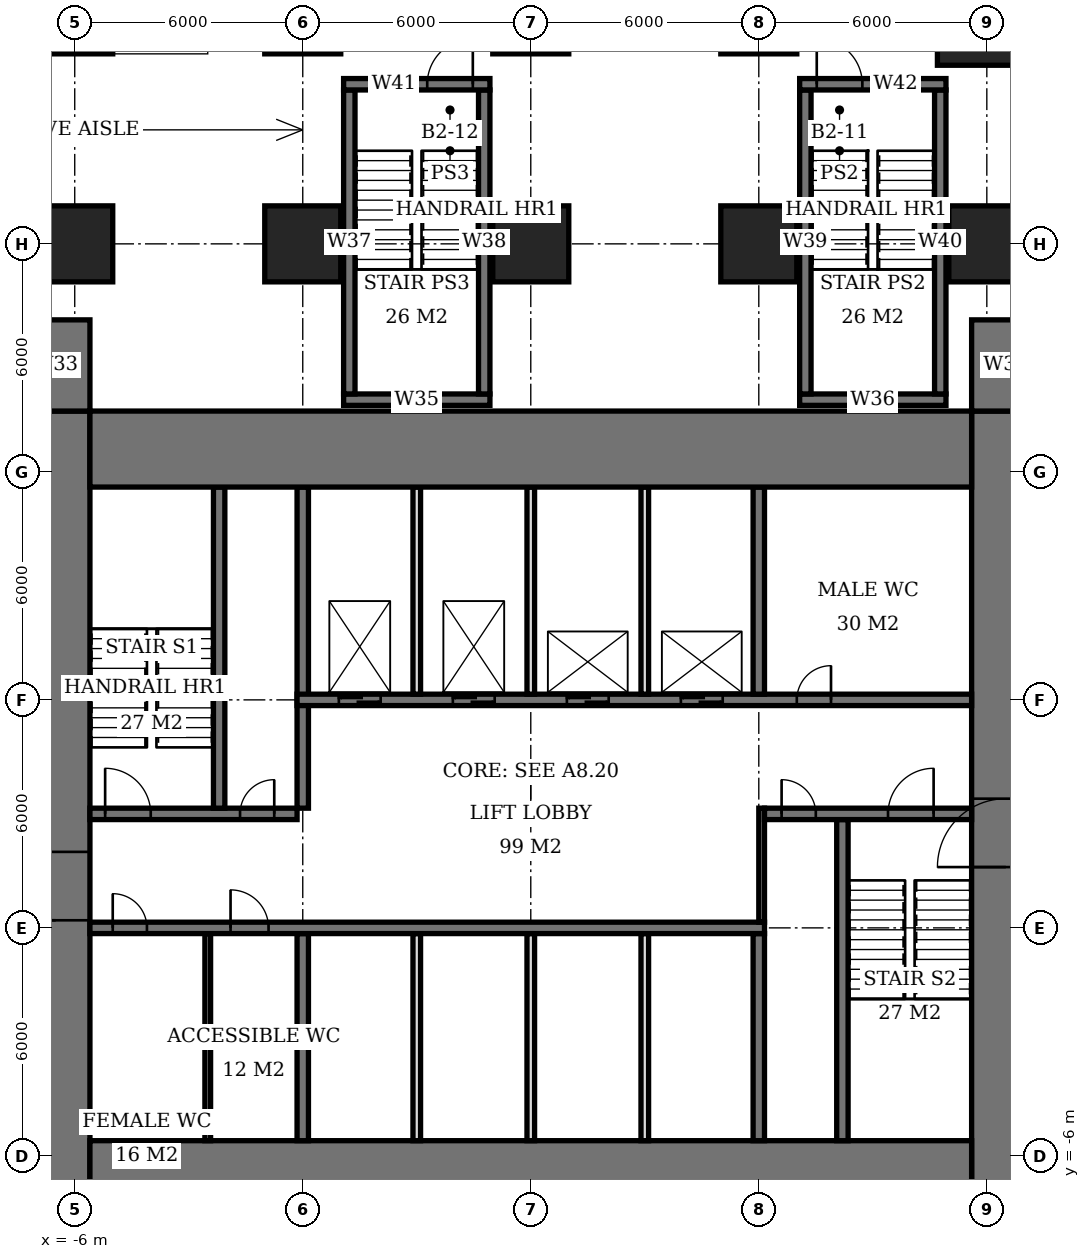
"""IFC4 building model, lengths in metres.
Left out: names, types, materials, properties, quantities, classifications, styles, units other than length and angle.
Written with IfcOpenShell. Run it as: python <this file> out.ifc"""

import sys

from ifc_helpers import new_model, si_unit, direction, frame, frame_2d, origin, origin_2d, place, context, subcontext, project, spatial, rectangle, extrude, element, fill, save


model = new_model("IFC4")
c1 = context("Model", 3, precision=1e-05, world=origin(), true_north=direction((0.0, 1.0)))
c2 = subcontext(c1, "Body", "Model", "MODEL_VIEW")
j1 = project(units=[si_unit("LENGTHUNIT", "METRE"), si_unit("PLANEANGLEUNIT", "RADIAN")], contexts=[c1])
p1 = place(None, origin())
s1 = spatial("IfcSite", under=j1, at=p1, CompositionType="ELEMENT")
p2 = place(p1, origin())
s2 = spatial("IfcBuilding", under=s1, at=p2, CompositionType="ELEMENT")
p3 = place(p2, frame((0.0, 0.0, -9.0)))
s3 = spatial("IfcBuildingStorey", under=s2, at=p3, CompositionType="ELEMENT", Elevation=-9.0)
for number, where, z_axis, x_axis in (
    (1, (-6.0, 18.0, 0.0), (0.0, 0.0, 1.0), (1.0, 0.0, 0.0)),
    (2, (-6.0, 24.0, 0.0), (0.0, 0.0, 1.0), (1.0, 0.0, 0.0)),
    (3, (0.0, 18.0, 0.0), (0.0, 0.0, 1.0), (1.0, 0.0, 0.0)),
    (4, (0.0, 24.0, 0.0), (0.0, 0.0, 1.0), (1.0, 0.0, 0.0)),
    (5, (6.0, 18.0, 0.0), (0.0, 0.0, 1.0), (1.0, 0.0, 0.0)),
    (6, (6.0, 24.0, 0.0), (0.0, 0.0, 1.0), (1.0, 0.0, 0.0)),
    (7, (12.0, 18.0, 0.0), (0.0, 0.0, 1.0), (1.0, 0.0, 0.0)),
    (8, (12.0, 24.0, 0.0), (0.0, 0.0, 1.0), (1.0, 0.0, 0.0)),
    (9, (18.0, 18.0, 0.0), (0.0, 0.0, 1.0), (1.0, 0.0, 0.0)),
):
    element("IfcColumn", number, at=place(p3, frame(where, z_axis=z_axis, x_axis=x_axis)), inside=s3, PredefinedType="COLUMN", context=c2, shape_type="SweptSolid", body=[
        extrude(rectangle(XDim=2.0, YDim=2.0, at=origin_2d()), origin(), (0.0, 0.0, 1.0), 4.5),
    ])
p4 = place(p3, frame((18.0, 24.0, 0.0), z_axis=(0.0, 0.0, 1.0), x_axis=(1.0, 0.0, 0.0)))
e10 = element("IfcColumn", 10, at=p4, inside=s3, PredefinedType="COLUMN", context=c2, shape_type="SweptSolid", body=[
    extrude(rectangle(XDim=2.6, YDim=2.6, at=origin_2d()), origin(), (0.0, 0.0, 1.0), 4.5),
])
for number, where, z_axis, x_axis in (
    (11, (-5.6, -6.6, 0.0), (0.0, 0.0, 1.0), (1.0, 0.0, 0.0)),
    (12, (-5.6, 12.6, 0.0), (0.0, 0.0, 1.0), (1.0, 0.0, 0.0)),
):
    element("IfcWall", number, at=place(p3, frame(where, z_axis=z_axis, x_axis=x_axis)), inside=s3, PredefinedType="SHEAR", context=c2, shape_type="SweptSolid", body=[
        extrude(rectangle(XDim=23.2, YDim=2.0, at=frame_2d((11.6, 0.0))), origin(), (0.0, 0.0, 1.0), 4.5),
    ])
p5 = place(p3, frame((-6.5, -7.6, 0.0), z_axis=(0.0, 0.0, 1.0), x_axis=(0.0, 1.0, 0.0)))
e13 = element("IfcWall", 13, at=p5, inside=s3, PredefinedType="SHEAR", context=c2, shape_type="SweptSolid", body=[
    extrude(rectangle(XDim=21.2, YDim=1.8, at=frame_2d((10.6, 0.0))), origin(), (0.0, 0.0, 1.0), 4.5),
])
p6 = place(p5, frame((7.8, 0.0, 0.0)))
e14 = element("IfcOpeningElement", 14, at=p6, cuts=e13, PredefinedType="OPENING", context=c2, shape_type="SweptSolid", body=[
    extrude(rectangle(XDim=1.8, YDim=2.4, at=frame_2d((0.9, 1.2))), frame((0.0, 0.91, 0.0), z_axis=(0.0, -1.0, 0.0), x_axis=(1.0, 0.0, 0.0)), (0.0, 0.0, 1.0), 1.82),
])
p7 = place(p3, frame((18.5, -7.6, 0.0), z_axis=(0.0, 0.0, 1.0), x_axis=(0.0, 1.0, 0.0)))
e15 = element("IfcWall", 15, at=p7, inside=s3, PredefinedType="SHEAR", context=c2, shape_type="SweptSolid", body=[
    extrude(rectangle(XDim=21.2, YDim=1.8, at=frame_2d((10.6, 0.0))), origin(), (0.0, 0.0, 1.0), 4.5),
])
p8 = place(p7, frame((9.2, 0.0, 0.0)))
e16 = element("IfcOpeningElement", 16, at=p8, cuts=e15, PredefinedType="OPENING", context=c2, shape_type="SweptSolid", body=[
    extrude(rectangle(XDim=1.8, YDim=2.4, at=frame_2d((0.9, 1.2))), frame((0.0, 0.91, 0.0), z_axis=(0.0, -1.0, 0.0), x_axis=(1.0, 0.0, 0.0)), (0.0, 0.0, 1.0), 1.82),
])
for number, where, z_axis, x_axis in (
    (17, (-6.5, 13.6, 0.0), (0.0, 0.0, 1.0), (0.0, 1.0, 0.0)),
    (18, (18.5, 13.6, 0.0), (0.0, 0.0, 1.0), (0.0, 1.0, 0.0)),
):
    element("IfcWall", number, at=place(p3, frame(where, z_axis=z_axis, x_axis=x_axis)), inside=s3, PredefinedType="SHEAR", context=c2, shape_type="SweptSolid", body=[
        extrude(rectangle(XDim=2.4, YDim=1.8, at=frame_2d((1.2, 0.0))), origin(), (0.0, 0.0, 1.0), 4.5),
    ])
p9 = place(p3, frame((-5.6, 0.0, 0.0), z_axis=(0.0, 0.0, 1.0), x_axis=(1.0, 0.0, 0.0)))
e19 = element("IfcWall", 19, at=p9, inside=s3, PredefinedType="SHEAR", context=c2, shape_type="SweptSolid", body=[
    extrude(rectangle(XDim=17.75, YDim=0.3, at=frame_2d((8.875, 0.0))), origin(), (0.0, 0.0, 1.0), 4.5),
])
p10 = place(p9, frame((0.6, 0.0, 0.0)))
e20 = element("IfcOpeningElement", 20, at=p10, cuts=e19, PredefinedType="OPENING", context=c2, shape_type="SweptSolid", body=[
    extrude(rectangle(XDim=0.9, YDim=2.1, at=frame_2d((0.45, 1.05))), frame((0.0, 0.16, 0.0), z_axis=(0.0, -1.0, 0.0), x_axis=(1.0, 0.0, 0.0)), (0.0, 0.0, 1.0), 0.32),
])
p11 = place(p9, frame((3.7, 0.0, 0.0)))
e21 = element("IfcOpeningElement", 21, at=p11, cuts=e19, PredefinedType="OPENING", context=c2, shape_type="SweptSolid", body=[
    extrude(rectangle(XDim=1.0, YDim=2.1, at=frame_2d((0.5, 1.05))), frame((0.0, 0.16, 0.0), z_axis=(0.0, -1.0, 0.0), x_axis=(1.0, 0.0, 0.0)), (0.0, 0.0, 1.0), 0.32),
])
p12 = place(p3, frame((-5.6, 3.0, 0.0), z_axis=(0.0, 0.0, 1.0), x_axis=(1.0, 0.0, 0.0)))
e22 = element("IfcWall", 22, at=p12, inside=s3, PredefinedType="SHEAR", context=c2, shape_type="SweptSolid", body=[
    extrude(rectangle(XDim=5.45, YDim=0.3, at=frame_2d((2.725, 0.0))), origin(), (0.0, 0.0, 1.0), 4.5),
])
p13 = place(p12, frame((0.4, 0.0, 0.0)))
e23 = element("IfcOpeningElement", 23, at=p13, cuts=e22, PredefinedType="OPENING", context=c2, shape_type="SweptSolid", body=[
    extrude(rectangle(XDim=1.2, YDim=2.1, at=frame_2d((0.6, 1.05))), frame((0.0, 0.16, 0.0), z_axis=(0.0, -1.0, 0.0), x_axis=(1.0, 0.0, 0.0)), (0.0, 0.0, 1.0), 0.32),
])
p14 = place(p12, frame((3.95, 0.0, 0.0)))
e24 = element("IfcOpeningElement", 24, at=p14, cuts=e22, PredefinedType="OPENING", context=c2, shape_type="SweptSolid", body=[
    extrude(rectangle(XDim=0.9, YDim=2.1, at=frame_2d((0.45, 1.05))), frame((0.0, 0.16, 0.0), z_axis=(0.0, -1.0, 0.0), x_axis=(1.0, 0.0, 0.0)), (0.0, 0.0, 1.0), 0.32),
])
p15 = place(p3, frame((12.15, 3.0, 0.0), z_axis=(0.0, 0.0, 1.0), x_axis=(1.0, 0.0, 0.0)))
e25 = element("IfcWall", 25, at=p15, inside=s3, PredefinedType="SHEAR", context=c2, shape_type="SweptSolid", body=[
    extrude(rectangle(XDim=5.45, YDim=0.3, at=frame_2d((2.725, 0.0))), origin(), (0.0, 0.0, 1.0), 4.5),
])
p16 = place(p15, frame((3.25, 0.0, 0.0)))
e26 = element("IfcOpeningElement", 26, at=p16, cuts=e25, PredefinedType="OPENING", context=c2, shape_type="SweptSolid", body=[
    extrude(rectangle(XDim=1.2, YDim=2.1, at=frame_2d((0.6, 1.05))), frame((0.0, 0.16, 0.0), z_axis=(0.0, -1.0, 0.0), x_axis=(1.0, 0.0, 0.0)), (0.0, 0.0, 1.0), 0.32),
])
p17 = place(p15, frame((0.45, 0.0, 0.0)))
e27 = element("IfcOpeningElement", 27, at=p17, cuts=e25, PredefinedType="OPENING", context=c2, shape_type="SweptSolid", body=[
    extrude(rectangle(XDim=0.9, YDim=2.1, at=frame_2d((0.45, 1.05))), frame((0.0, 0.16, 0.0), z_axis=(0.0, -1.0, 0.0), x_axis=(1.0, 0.0, 0.0)), (0.0, 0.0, 1.0), 0.32),
])
p18 = place(p3, frame((-0.15, 6.0, 0.0), z_axis=(0.0, 0.0, 1.0), x_axis=(1.0, 0.0, 0.0)))
e28 = element("IfcWall", 28, at=p18, inside=s3, PredefinedType="SHEAR", context=c2, shape_type="SweptSolid", body=[
    extrude(rectangle(XDim=17.75, YDim=0.3, at=frame_2d((8.875, 0.0))), origin(), (0.0, 0.0, 1.0), 4.5),
])
p19 = place(p18, frame((13.15, 0.0, 0.0)))
e29 = element("IfcOpeningElement", 29, at=p19, cuts=e28, PredefinedType="OPENING", context=c2, shape_type="SweptSolid", body=[
    extrude(rectangle(XDim=0.9, YDim=2.1, at=frame_2d((0.45, 1.05))), frame((0.0, 0.16, 0.0), z_axis=(0.0, -1.0, 0.0), x_axis=(1.0, 0.0, 0.0)), (0.0, 0.0, 1.0), 0.32),
])
p20 = place(p18, frame((1.1, 0.0, 0.0)))
e30 = element("IfcOpeningElement", 30, at=p20, cuts=e28, PredefinedType="OPENING", context=c2, shape_type="SweptSolid", body=[
    extrude(rectangle(XDim=1.1, YDim=2.1, at=frame_2d((0.55, 1.05))), frame((0.0, 0.16, 0.0), z_axis=(0.0, -1.0, 0.0), x_axis=(1.0, 0.0, 0.0)), (0.0, 0.0, 1.0), 0.32),
])
p21 = place(p18, frame((4.1, 0.0, 0.0)))
e31 = element("IfcOpeningElement", 31, at=p21, cuts=e28, PredefinedType="OPENING", context=c2, shape_type="SweptSolid", body=[
    extrude(rectangle(XDim=1.1, YDim=2.1, at=frame_2d((0.55, 1.05))), frame((0.0, 0.16, 0.0), z_axis=(0.0, -1.0, 0.0), x_axis=(1.0, 0.0, 0.0)), (0.0, 0.0, 1.0), 0.32),
])
p22 = place(p18, frame((7.1, 0.0, 0.0)))
e32 = element("IfcOpeningElement", 32, at=p22, cuts=e28, PredefinedType="OPENING", context=c2, shape_type="SweptSolid", body=[
    extrude(rectangle(XDim=1.1, YDim=2.1, at=frame_2d((0.55, 1.05))), frame((0.0, 0.16, 0.0), z_axis=(0.0, -1.0, 0.0), x_axis=(1.0, 0.0, 0.0)), (0.0, 0.0, 1.0), 0.32),
])
p23 = place(p18, frame((10.1, 0.0, 0.0)))
e33 = element("IfcOpeningElement", 33, at=p23, cuts=e28, PredefinedType="OPENING", context=c2, shape_type="SweptSolid", body=[
    extrude(rectangle(XDim=1.1, YDim=2.1, at=frame_2d((0.55, 1.05))), frame((0.0, 0.16, 0.0), z_axis=(0.0, -1.0, 0.0), x_axis=(1.0, 0.0, 0.0)), (0.0, 0.0, 1.0), 0.32),
])
p24 = place(p3, frame((0.0, -5.6, 0.0), z_axis=(0.0, 0.0, 1.0), x_axis=(0.0, 1.0, 0.0)))
e34 = element("IfcWall", 34, at=p24, inside=s3, PredefinedType="SHEAR", context=c2, shape_type="SweptSolid", body=[
    extrude(rectangle(XDim=5.45, YDim=0.3, at=frame_2d((2.725, 0.0))), origin(), (0.0, 0.0, 1.0), 4.5),
])
p25 = place(p3, frame((0.0, 3.15, 0.0), z_axis=(0.0, 0.0, 1.0), x_axis=(0.0, 1.0, 0.0)))
e35 = element("IfcWall", 35, at=p25, inside=s3, PredefinedType="SHEAR", context=c2, shape_type="SweptSolid", body=[
    extrude(rectangle(XDim=8.45, YDim=0.3, at=frame_2d((4.225, 0.0))), origin(), (0.0, 0.0, 1.0), 4.5),
])
for number, where, z_axis, x_axis in (
    (36, (12.0, -5.6, 0.0), (0.0, 0.0, 1.0), (0.0, 1.0, 0.0)),
    (37, (12.0, 6.15, 0.0), (0.0, 0.0, 1.0), (0.0, 1.0, 0.0)),
):
    element("IfcWall", number, at=place(p3, frame(where, z_axis=z_axis, x_axis=x_axis)), inside=s3, PredefinedType="SHEAR", context=c2, shape_type="SweptSolid", body=[
        extrude(rectangle(XDim=5.45, YDim=0.3, at=frame_2d((2.725, 0.0))), origin(), (0.0, 0.0, 1.0), 4.5),
    ])
for number, where, z_axis, x_axis in (
    (38, (-2.2, 3.15, 0.0), (0.0, 0.0, 1.0), (0.0, 1.0, 0.0)),
    (39, (14.2, -5.6, 0.0), (0.0, 0.0, 1.0), (0.0, 1.0, 0.0)),
):
    element("IfcWall", number, at=place(p3, frame(where, z_axis=z_axis, x_axis=x_axis)), inside=s3, PredefinedType="SHEAR", context=c2, shape_type="SweptSolid", body=[
        extrude(rectangle(XDim=8.45, YDim=0.3, at=frame_2d((4.225, 0.0))), origin(), (0.0, 0.0, 1.0), 4.5),
    ])
for number, where, z_axis, x_axis in (
    (40, (3.0, 6.15, -1.2), (0.0, 0.0, 1.0), (0.0, 1.0, 0.0)),
    (41, (6.0, 6.15, -1.2), (0.0, 0.0, 1.0), (0.0, 1.0, 0.0)),
    (42, (9.0, 6.15, -1.2), (0.0, 0.0, 1.0), (0.0, 1.0, 0.0)),
):
    element("IfcWall", number, at=place(p3, frame(where, z_axis=z_axis, x_axis=x_axis)), inside=s3, PredefinedType="SOLIDWALL", context=c2, shape_type="SweptSolid", body=[
        extrude(rectangle(XDim=5.45, YDim=0.2, at=frame_2d((2.725, 0.0))), origin(), (0.0, 0.0, 1.0), 5.7),
    ])
for number, where, z_axis, x_axis in (
    (43, (3.0, -5.6, 0.0), (0.0, 0.0, 1.0), (0.0, 1.0, 0.0)),
    (44, (6.0, -5.6, 0.0), (0.0, 0.0, 1.0), (0.0, 1.0, 0.0)),
    (45, (9.0, -5.6, 0.0), (0.0, 0.0, 1.0), (0.0, 1.0, 0.0)),
):
    element("IfcWall", number, at=place(p3, frame(where, z_axis=z_axis, x_axis=x_axis)), inside=s3, PredefinedType="SOLIDWALL", context=c2, shape_type="SweptSolid", body=[
        extrude(rectangle(XDim=5.45, YDim=0.2, at=frame_2d((2.725, 0.0))), origin(), (0.0, 0.0, 1.0), 4.5),
    ])
p26 = place(p3, frame((-2.5, -5.6, 0.0), z_axis=(0.0, 0.0, 1.0), x_axis=(0.0, 1.0, 0.0)))
e46 = element("IfcWall", 46, at=p26, inside=s3, PredefinedType="PLUMBINGWALL", context=c2, shape_type="SweptSolid", body=[
    extrude(rectangle(XDim=5.45, YDim=0.15, at=frame_2d((2.725, 0.0))), origin(), (0.0, 0.0, 1.0), 4.25),
])
p27 = place(p3, frame((13.075, 13.9, 0.0), z_axis=(0.0, 0.0, 1.0), x_axis=(1.0, 0.0, 0.0)))
e47 = element("IfcWall", 47, at=p27, inside=s3, PredefinedType="SOLIDWALL", context=c2, shape_type="SweptSolid", body=[
    extrude(rectangle(XDim=3.85, YDim=0.3, at=frame_2d((1.925, 0.0))), origin(), (0.0, 0.0, 1.0), 4.25),
])
p28 = place(p3, frame((13.075, 22.2, 0.0), z_axis=(0.0, 0.0, 1.0), x_axis=(1.0, 0.0, 0.0)))
e48 = element("IfcWall", 48, at=p28, inside=s3, PredefinedType="SOLIDWALL", context=c2, shape_type="SweptSolid", body=[
    extrude(rectangle(XDim=3.85, YDim=0.3, at=frame_2d((1.925, 0.0))), origin(), (0.0, 0.0, 1.0), 4.25),
])
p29 = place(p28, frame((0.45, 0.0, 0.0)))
e49 = element("IfcOpeningElement", 49, at=p29, cuts=e48, PredefinedType="OPENING", context=c2, shape_type="SweptSolid", body=[
    extrude(rectangle(XDim=1.2, YDim=2.1, at=frame_2d((0.6, 1.05))), frame((0.0, 0.16, 0.0), z_axis=(0.0, -1.0, 0.0), x_axis=(1.0, 0.0, 0.0)), (0.0, 0.0, 1.0), 0.32),
])
for number, where, z_axis, x_axis in (
    (50, (13.225, 14.05, 0.0), (0.0, 0.0, 1.0), (0.0, 1.0, 0.0)),
    (51, (16.775, 14.05, 0.0), (0.0, 0.0, 1.0), (0.0, 1.0, 0.0)),
):
    element("IfcWall", number, at=place(p3, frame(where, z_axis=z_axis, x_axis=x_axis)), inside=s3, PredefinedType="SOLIDWALL", context=c2, shape_type="SweptSolid", body=[
        extrude(rectangle(XDim=8.0, YDim=0.3, at=frame_2d((4.0, 0.0))), origin(), (0.0, 0.0, 1.0), 4.25),
    ])
p30 = place(p3, frame((1.075, 13.9, 0.0), z_axis=(0.0, 0.0, 1.0), x_axis=(1.0, 0.0, 0.0)))
e52 = element("IfcWall", 52, at=p30, inside=s3, PredefinedType="SOLIDWALL", context=c2, shape_type="SweptSolid", body=[
    extrude(rectangle(XDim=3.85, YDim=0.3, at=frame_2d((1.925, 0.0))), origin(), (0.0, 0.0, 1.0), 4.25),
])
p31 = place(p3, frame((1.075, 22.2, 0.0), z_axis=(0.0, 0.0, 1.0), x_axis=(1.0, 0.0, 0.0)))
e53 = element("IfcWall", 53, at=p31, inside=s3, PredefinedType="SOLIDWALL", context=c2, shape_type="SweptSolid", body=[
    extrude(rectangle(XDim=3.85, YDim=0.3, at=frame_2d((1.925, 0.0))), origin(), (0.0, 0.0, 1.0), 4.25),
])
p32 = place(p31, frame((2.2, 0.0, 0.0)))
e54 = element("IfcOpeningElement", 54, at=p32, cuts=e53, PredefinedType="OPENING", context=c2, shape_type="SweptSolid", body=[
    extrude(rectangle(XDim=1.2, YDim=2.1, at=frame_2d((0.6, 1.05))), frame((0.0, 0.16, 0.0), z_axis=(0.0, -1.0, 0.0), x_axis=(1.0, 0.0, 0.0)), (0.0, 0.0, 1.0), 0.32),
])
for number, where, z_axis, x_axis in (
    (55, (1.225, 14.05, 0.0), (0.0, 0.0, 1.0), (0.0, 1.0, 0.0)),
    (56, (4.775, 14.05, 0.0), (0.0, 0.0, 1.0), (0.0, 1.0, 0.0)),
):
    element("IfcWall", number, at=place(p3, frame(where, z_axis=z_axis, x_axis=x_axis)), inside=s3, PredefinedType="SOLIDWALL", context=c2, shape_type="SweptSolid", body=[
        extrude(rectangle(XDim=8.0, YDim=0.3, at=frame_2d((4.0, 0.0))), origin(), (0.0, 0.0, 1.0), 4.25),
    ])
p33 = place(p3, frame((12.075, 0.15, 0.0), z_axis=(0.0, 0.0, 1.0), x_axis=(0.0, 1.0, 0.0)))
e57 = element("IfcWall", 57, at=p33, inside=s3, PredefinedType="PARTITIONING", context=c2, shape_type="SweptSolid", body=[
    extrude(rectangle(XDim=3.0, YDim=0.15, at=frame_2d((1.5, 0.0))), origin(), (0.0, 0.0, 1.0), 4.25),
])
p34 = place(p6, origin())
e58 = element("IfcDoor", 58, at=p34, inside=s3, OperationType="DOUBLE_DOOR_SINGLE_SWING", PredefinedType="DOOR", context=c2, shape_type="SweptSolid", body=[
    extrude(rectangle(XDim=1.8, YDim=2.4, at=frame_2d((0.9, 1.2))), frame((0.0, 0.025, 0.0), z_axis=(0.0, -1.0, 0.0), x_axis=(1.0, 0.0, 0.0)), (0.0, 0.0, 1.0), 0.05),
])
fill(e14, e58)
p35 = place(p8, origin())
e59 = element("IfcDoor", 59, at=p35, inside=s3, OperationType="DOUBLE_DOOR_SINGLE_SWING", PredefinedType="DOOR", context=c2, shape_type="SweptSolid", body=[
    extrude(rectangle(XDim=1.8, YDim=2.4, at=frame_2d((0.9, 1.2))), frame((0.0, 0.025, 0.0), z_axis=(0.0, -1.0, 0.0), x_axis=(1.0, 0.0, 0.0)), (0.0, 0.0, 1.0), 0.05),
])
fill(e16, e59)
p36 = place(p13, origin())
e60 = element("IfcDoor", 60, at=p36, inside=s3, OperationType="SINGLE_SWING_LEFT", PredefinedType="DOOR", context=c2, shape_type="SweptSolid", body=[
    extrude(rectangle(XDim=1.2, YDim=2.1, at=frame_2d((0.6, 1.05))), frame((0.0, 0.025, 0.0), z_axis=(0.0, -1.0, 0.0), x_axis=(1.0, 0.0, 0.0)), (0.0, 0.0, 1.0), 0.05),
])
fill(e23, e60)
p37 = place(p14, origin())
e61 = element("IfcDoor", 61, at=p37, inside=s3, OperationType="SINGLE_SWING_RIGHT", PredefinedType="DOOR", context=c2, shape_type="SweptSolid", body=[
    extrude(rectangle(XDim=0.9, YDim=2.1, at=frame_2d((0.45, 1.05))), frame((0.0, 0.025, 0.0), z_axis=(0.0, -1.0, 0.0), x_axis=(1.0, 0.0, 0.0)), (0.0, 0.0, 1.0), 0.05),
])
fill(e24, e61)
p38 = place(p16, origin())
e62 = element("IfcDoor", 62, at=p38, inside=s3, OperationType="SINGLE_SWING_RIGHT", PredefinedType="DOOR", context=c2, shape_type="SweptSolid", body=[
    extrude(rectangle(XDim=1.2, YDim=2.1, at=frame_2d((0.6, 1.05))), frame((0.0, 0.025, 0.0), z_axis=(0.0, -1.0, 0.0), x_axis=(1.0, 0.0, 0.0)), (0.0, 0.0, 1.0), 0.05),
])
fill(e26, e62)
p39 = place(p17, origin())
e63 = element("IfcDoor", 63, at=p39, inside=s3, OperationType="SINGLE_SWING_LEFT", PredefinedType="DOOR", context=c2, shape_type="SweptSolid", body=[
    extrude(rectangle(XDim=0.9, YDim=2.1, at=frame_2d((0.45, 1.05))), frame((0.0, 0.025, 0.0), z_axis=(0.0, -1.0, 0.0), x_axis=(1.0, 0.0, 0.0)), (0.0, 0.0, 1.0), 0.05),
])
fill(e27, e63)
p40 = place(p10, origin())
e64 = element("IfcDoor", 64, at=p40, inside=s3, OperationType="SINGLE_SWING_LEFT", PredefinedType="DOOR", context=c2, shape_type="SweptSolid", body=[
    extrude(rectangle(XDim=0.9, YDim=2.1, at=frame_2d((0.45, 1.05))), frame((0.0, 0.025, 0.0), z_axis=(0.0, -1.0, 0.0), x_axis=(1.0, 0.0, 0.0)), (0.0, 0.0, 1.0), 0.05),
])
fill(e20, e64)
p41 = place(p11, origin())
e65 = element("IfcDoor", 65, at=p41, inside=s3, OperationType="SINGLE_SWING_LEFT", PredefinedType="DOOR", context=c2, shape_type="SweptSolid", body=[
    extrude(rectangle(XDim=1.0, YDim=2.1, at=frame_2d((0.5, 1.05))), frame((0.0, 0.025, 0.0), z_axis=(0.0, -1.0, 0.0), x_axis=(1.0, 0.0, 0.0)), (0.0, 0.0, 1.0), 0.05),
])
fill(e21, e65)
p42 = place(p19, origin())
e66 = element("IfcDoor", 66, at=p42, inside=s3, OperationType="SINGLE_SWING_RIGHT", PredefinedType="DOOR", context=c2, shape_type="SweptSolid", body=[
    extrude(rectangle(XDim=0.9, YDim=2.1, at=frame_2d((0.45, 1.05))), frame((0.0, 0.025, 0.0), z_axis=(0.0, -1.0, 0.0), x_axis=(1.0, 0.0, 0.0)), (0.0, 0.0, 1.0), 0.05),
])
fill(e29, e66)
p43 = place(p20, origin())
e67 = element("IfcDoor", 67, at=p43, inside=s3, OperationType="DOUBLE_DOOR_SLIDING", PredefinedType="USERDEFINED", context=c2, shape_type="SweptSolid", body=[
    extrude(rectangle(XDim=1.1, YDim=2.1, at=frame_2d((0.55, 1.05))), frame((0.0, 0.025, 0.0), z_axis=(0.0, -1.0, 0.0), x_axis=(1.0, 0.0, 0.0)), (0.0, 0.0, 1.0), 0.05),
])
fill(e30, e67)
p44 = place(p21, origin())
e68 = element("IfcDoor", 68, at=p44, inside=s3, OperationType="DOUBLE_DOOR_SLIDING", PredefinedType="USERDEFINED", context=c2, shape_type="SweptSolid", body=[
    extrude(rectangle(XDim=1.1, YDim=2.1, at=frame_2d((0.55, 1.05))), frame((0.0, 0.025, 0.0), z_axis=(0.0, -1.0, 0.0), x_axis=(1.0, 0.0, 0.0)), (0.0, 0.0, 1.0), 0.05),
])
fill(e31, e68)
p45 = place(p22, origin())
e69 = element("IfcDoor", 69, at=p45, inside=s3, OperationType="DOUBLE_DOOR_SLIDING", PredefinedType="USERDEFINED", context=c2, shape_type="SweptSolid", body=[
    extrude(rectangle(XDim=1.1, YDim=2.1, at=frame_2d((0.55, 1.05))), frame((0.0, 0.025, 0.0), z_axis=(0.0, -1.0, 0.0), x_axis=(1.0, 0.0, 0.0)), (0.0, 0.0, 1.0), 0.05),
])
fill(e32, e69)
p46 = place(p23, origin())
e70 = element("IfcDoor", 70, at=p46, inside=s3, OperationType="DOUBLE_DOOR_SLIDING", PredefinedType="USERDEFINED", context=c2, shape_type="SweptSolid", body=[
    extrude(rectangle(XDim=1.1, YDim=2.1, at=frame_2d((0.55, 1.05))), frame((0.0, 0.025, 0.0), z_axis=(0.0, -1.0, 0.0), x_axis=(1.0, 0.0, 0.0)), (0.0, 0.0, 1.0), 0.05),
])
fill(e33, e70)
p47 = place(p29, origin())
e71 = element("IfcDoor", 71, at=p47, inside=s3, OperationType="SINGLE_SWING_LEFT", PredefinedType="DOOR", context=c2, shape_type="SweptSolid", body=[
    extrude(rectangle(XDim=1.2, YDim=2.1, at=frame_2d((0.6, 1.05))), frame((0.0, 0.025, 0.0), z_axis=(0.0, -1.0, 0.0), x_axis=(1.0, 0.0, 0.0)), (0.0, 0.0, 1.0), 0.05),
])
fill(e49, e71)
p48 = place(p32, origin())
e72 = element("IfcDoor", 72, at=p48, inside=s3, OperationType="SINGLE_SWING_RIGHT", PredefinedType="DOOR", context=c2, shape_type="SweptSolid", body=[
    extrude(rectangle(XDim=1.2, YDim=2.1, at=frame_2d((0.6, 1.05))), frame((0.0, 0.025, 0.0), z_axis=(0.0, -1.0, 0.0), x_axis=(1.0, 0.0, 0.0)), (0.0, 0.0, 1.0), 0.05),
])
fill(e54, e72)
save(model, sys.argv[1])
